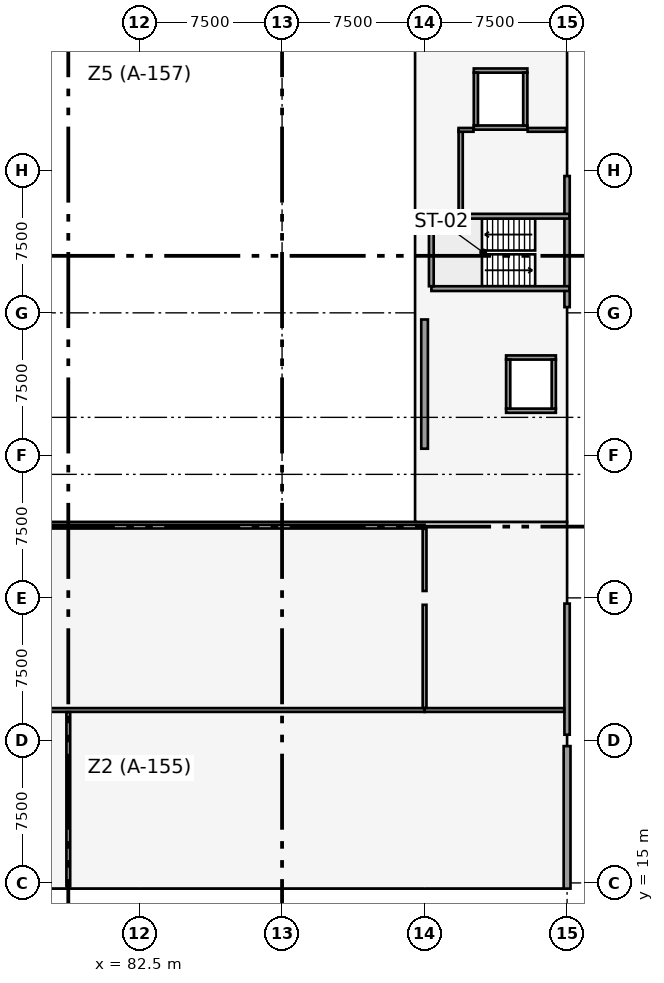
"""IFC4 building model, lengths in metres.
Left out: names, types, materials, properties, quantities, classifications, styles, units other than length and angle.
Written with IfcOpenShell. Run it as: python <this file> out.ifc"""

import sys

from ifc_helpers import new_model, si_unit, direction, frame, frame_2d, origin, origin_2d, place, context, subcontext, project, spatial, rectangle, extrude, element, fill, save


model = new_model("IFC4")
c1 = context("Model", 3, precision=1e-05, world=origin(), true_north=direction((0.0, 1.0)))
c2 = subcontext(c1, "Body", "Model", "MODEL_VIEW")
j1 = project(units=[si_unit("LENGTHUNIT", "METRE"), si_unit("PLANEANGLEUNIT", "RADIAN")], contexts=[c1])
p1 = place(None, origin())
s1 = spatial("IfcSite", under=j1, at=p1, CompositionType="ELEMENT")
p2 = place(p1, origin())
s2 = spatial("IfcBuilding", under=s1, at=p2, CompositionType="ELEMENT")
p3 = place(p2, frame((0.0, 0.0, 17.1)))
s3 = spatial("IfcBuildingStorey", under=s2, at=p3, CompositionType="ELEMENT", Elevation=17.1)
for number, where, z_axis, x_axis in (
    (1, (90.0, 22.5, 0.0), (0.0, 0.0, 1.0), (1.0, 0.0, 0.0)),
    (2, (90.0, 30.0, 0.0), (0.0, 0.0, 1.0), (1.0, 0.0, 0.0)),
    (3, (97.5, 22.5, 0.0), (0.0, 0.0, 1.0), (1.0, 0.0, 0.0)),
    (4, (97.5, 30.0, 0.0), (0.0, 0.0, 1.0), (1.0, 0.0, 0.0)),
    (5, (97.5, 37.5, 0.0), (0.0, 0.0, 1.0), (1.0, 0.0, 0.0)),
    (6, (97.5, 45.0, 0.0), (0.0, 0.0, 1.0), (1.0, 0.0, 0.0)),
    (7, (97.5, 52.5, 0.0), (0.0, 0.0, 1.0), (1.0, 0.0, 0.0)),
):
    element("IfcColumn", number, at=place(p3, frame(where, z_axis=z_axis, x_axis=x_axis)), inside=s3, PredefinedType="COLUMN", context=c2, shape_type="SweptSolid", body=[
        extrude(rectangle(XDim=0.7, YDim=0.7, at=origin_2d()), origin(), (0.0, 0.0, 1.0), 3.9),
    ])
p4 = place(p3, frame((105.0, 22.5, 0.0), z_axis=(0.0, 0.0, 1.0), x_axis=(1.0, 0.0, 0.0)))
e8 = element("IfcColumn", 8, at=p4, inside=s3, PredefinedType="COLUMN", context=c2, shape_type="SweptSolid", body=[
    extrude(rectangle(XDim=0.6, YDim=1.1, at=origin_2d()), origin(), (0.0, 0.0, 1.0), 3.9),
])
for number, where, z_axis, x_axis in (
    (9, (105.0, 30.0, 0.0), (0.0, 0.0, 1.0), (1.0, 0.0, 0.0)),
    (10, (105.0, 37.5, 0.0), (0.0, 0.0, 1.0), (1.0, 0.0, 0.0)),
    (11, (105.0, 45.0, 0.0), (0.0, 0.0, 1.0), (1.0, 0.0, 0.0)),
    (12, (105.0, 52.5, 0.0), (0.0, 0.0, 1.0), (1.0, 0.0, 0.0)),
):
    element("IfcColumn", number, at=place(p3, frame(where, z_axis=z_axis, x_axis=x_axis)), inside=s3, PredefinedType="COLUMN", context=c2, shape_type="SweptSolid", body=[
        extrude(rectangle(XDim=0.7, YDim=0.7, at=origin_2d()), origin(), (0.0, 0.0, 1.0), 3.9),
    ])
p5 = place(p3, frame((97.5, 37.85, 0.0), z_axis=(0.0, 0.0, 1.0), x_axis=(0.0, 1.0, 0.0)))
e13 = element("IfcWall", 13, at=p5, inside=s3, PredefinedType="SHEAR", context=c2, shape_type="SweptSolid", body=[
    extrude(rectangle(XDim=6.8, YDim=0.35, at=frame_2d((3.4, 0.0))), origin(), (0.0, 0.0, 1.0), 2.42),
])
p6 = place(p3, frame((105.0, 14.7, 0.0), z_axis=(0.0, 0.0, 1.0), x_axis=(0.0, 1.0, 0.0)))
e14 = element("IfcWall", 14, at=p6, inside=s3, PredefinedType="SOLIDWALL", context=c2, shape_type="SweptSolid", body=[
    extrude(rectangle(XDim=7.5, YDim=0.36, at=frame_2d((3.75, 0.0))), origin(), (0.0, 0.0, 1.0), 2.39),
])
p7 = place(p3, frame((105.0, 22.8, 0.0), z_axis=(0.0, 0.0, 1.0), x_axis=(0.0, 1.0, 0.0)))
e15 = element("IfcWall", 15, at=p7, inside=s3, PredefinedType="SOLIDWALL", context=c2, shape_type="SweptSolid", body=[
    extrude(rectangle(XDim=6.9, YDim=0.28, at=frame_2d((3.45, 0.0))), origin(), (0.0, 0.0, 1.0), 2.39),
])
p8 = place(p3, frame((105.0, 45.3, 0.0), z_axis=(0.0, 0.0, 1.0), x_axis=(0.0, 1.0, 0.0)))
e16 = element("IfcWall", 16, at=p8, inside=s3, PredefinedType="SOLIDWALL", context=c2, shape_type="SweptSolid", body=[
    extrude(rectangle(XDim=6.9, YDim=0.28, at=frame_2d((3.45, 0.0))), origin(), (0.0, 0.0, 1.0), 2.54),
])
p9 = place(p3, frame((97.86, 46.275, 0.0), z_axis=(0.0, 0.0, 1.0), x_axis=(1.0, 0.0, 0.0)))
e17 = element("IfcWall", 17, at=p9, inside=s3, PredefinedType="SOLIDWALL", context=c2, shape_type="SweptSolid", body=[
    extrude(rectangle(XDim=7.26, YDim=0.25, at=frame_2d((3.63, 0.0))), origin(), (0.0, 0.0, 1.0), 3.62),
])
p10 = place(p9, frame((5.54, 0.0, 0.0)))
e18 = element("IfcOpeningElement", 18, at=p10, cuts=e17, PredefinedType="OPENING", context=c2, shape_type="SweptSolid", body=[
    extrude(rectangle(XDim=1.1, YDim=2.15, at=frame_2d((0.55, 1.075))), frame((0.0, 0.135, 0.0), z_axis=(0.0, -1.0, 0.0), x_axis=(1.0, 0.0, 0.0)), (0.0, 0.0, 1.0), 0.27),
])
p11 = place(p3, frame((97.86, 50.085, 0.0), z_axis=(0.0, 0.0, 1.0), x_axis=(1.0, 0.0, 0.0)))
e19 = element("IfcWall", 19, at=p11, inside=s3, PredefinedType="SOLIDWALL", context=c2, shape_type="SweptSolid", body=[
    extrude(rectangle(XDim=7.26, YDim=0.25, at=frame_2d((3.63, 0.0))), origin(), (0.0, 0.0, 1.0), 3.62),
])
p12 = place(p11, frame((5.54, 0.0, 0.0)))
e20 = element("IfcOpeningElement", 20, at=p12, cuts=e19, PredefinedType="OPENING", context=c2, shape_type="SweptSolid", body=[
    extrude(rectangle(XDim=1.1, YDim=2.15, at=frame_2d((0.55, 1.075))), frame((0.0, 0.135, 0.0), z_axis=(0.0, -1.0, 0.0), x_axis=(1.0, 0.0, 0.0)), (0.0, 0.0, 1.0), 0.27),
])
p13 = place(p3, frame((97.855, 46.4, 0.0), z_axis=(0.0, 0.0, 1.0), x_axis=(0.0, 1.0, 0.0)))
e21 = element("IfcWall", 21, at=p13, inside=s3, PredefinedType="SOLIDWALL", context=c2, shape_type="SweptSolid", body=[
    extrude(rectangle(XDim=3.56, YDim=0.25, at=frame_2d((1.78, 0.0))), origin(), (0.0, 0.0, 1.0), 3.62),
])
for number, where, z_axis, x_axis in (
    (22, (101.79, 39.85, 0.0), (0.0, 0.0, 1.0), (1.0, 0.0, 0.0)),
    (23, (101.79, 42.65, 0.0), (0.0, 0.0, 1.0), (1.0, 0.0, 0.0)),
):
    element("IfcWall", number, at=place(p3, frame(where, z_axis=z_axis, x_axis=x_axis)), inside=s3, PredefinedType="SOLIDWALL", context=c2, shape_type="SweptSolid", body=[
        extrude(rectangle(XDim=2.62, YDim=0.22, at=frame_2d((1.31, 0.0))), origin(), (0.0, 0.0, 1.0), 3.62),
    ])
p14 = place(p3, frame((101.9, 39.96, 0.0), z_axis=(0.0, 0.0, 1.0), x_axis=(0.0, 1.0, 0.0)))
e24 = element("IfcWall", 24, at=p14, inside=s3, PredefinedType="SOLIDWALL", context=c2, shape_type="SweptSolid", body=[
    extrude(rectangle(XDim=2.58, YDim=0.22, at=frame_2d((1.29, 0.0))), origin(), (0.0, 0.0, 1.0), 3.62),
])
p15 = place(p14, frame((0.79, 0.0, 0.0)))
e25 = element("IfcOpeningElement", 25, at=p15, cuts=e24, PredefinedType="OPENING", context=c2, shape_type="SweptSolid", body=[
    extrude(rectangle(XDim=1.0, YDim=2.15, at=frame_2d((0.5, 1.075))), frame((0.0, 0.12, 0.0), z_axis=(0.0, -1.0, 0.0), x_axis=(1.0, 0.0, 0.0)), (0.0, 0.0, 1.0), 0.24),
])
p16 = place(p3, frame((104.3, 39.96, 0.0), z_axis=(0.0, 0.0, 1.0), x_axis=(0.0, 1.0, 0.0)))
e26 = element("IfcWall", 26, at=p16, inside=s3, PredefinedType="SOLIDWALL", context=c2, shape_type="SweptSolid", body=[
    extrude(rectangle(XDim=2.58, YDim=0.22, at=frame_2d((1.29, 0.0))), origin(), (0.0, 0.0, 1.0), 3.62),
])
p17 = place(p3, frame((100.09, 54.75, 0.0), z_axis=(0.0, 0.0, 1.0), x_axis=(1.0, 0.0, 0.0)))
e27 = element("IfcWall", 27, at=p17, inside=s3, PredefinedType="SOLIDWALL", context=c2, shape_type="SweptSolid", body=[
    extrude(rectangle(XDim=2.82, YDim=0.22, at=frame_2d((1.41, 0.0))), origin(), (0.0, 0.0, 1.0), 3.62),
])
p18 = place(p17, frame((0.86, 0.0, 0.0)))
e28 = element("IfcOpeningElement", 28, at=p18, cuts=e27, PredefinedType="OPENING", context=c2, shape_type="SweptSolid", body=[
    extrude(rectangle(XDim=1.1, YDim=2.15, at=frame_2d((0.55, 1.075))), frame((0.0, 0.12, 0.0), z_axis=(0.0, -1.0, 0.0), x_axis=(1.0, 0.0, 0.0)), (0.0, 0.0, 1.0), 0.24),
])
p19 = place(p3, frame((100.09, 57.75, 0.0), z_axis=(0.0, 0.0, 1.0), x_axis=(1.0, 0.0, 0.0)))
e29 = element("IfcWall", 29, at=p19, inside=s3, PredefinedType="SOLIDWALL", context=c2, shape_type="SweptSolid", body=[
    extrude(rectangle(XDim=2.82, YDim=0.22, at=frame_2d((1.41, 0.0))), origin(), (0.0, 0.0, 1.0), 3.62),
])
for number, where, z_axis, x_axis in (
    (30, (100.2, 54.86, 0.0), (0.0, 0.0, 1.0), (0.0, 1.0, 0.0)),
    (31, (102.8, 54.86, 0.0), (0.0, 0.0, 1.0), (0.0, 1.0, 0.0)),
):
    element("IfcWall", number, at=place(p3, frame(where, z_axis=z_axis, x_axis=x_axis)), inside=s3, PredefinedType="SOLIDWALL", context=c2, shape_type="SweptSolid", body=[
        extrude(rectangle(XDim=2.78, YDim=0.22, at=frame_2d((1.39, 0.0))), origin(), (0.0, 0.0, 1.0), 3.62),
    ])
p20 = place(p3, frame((99.4, 50.22, 0.0), z_axis=(0.0, 0.0, 1.0), x_axis=(0.0, 1.0, 0.0)))
e32 = element("IfcWall", 32, at=p20, inside=s3, PredefinedType="SOLIDWALL", context=c2, shape_type="SweptSolid", body=[
    extrude(rectangle(XDim=4.41, YDim=0.22, at=frame_2d((2.205, 0.0))), origin(), (0.0, 0.0, 1.0), 3.62),
])
p21 = place(p20, frame((0.45, 0.0, 0.0)))
e33 = element("IfcOpeningElement", 33, at=p21, cuts=e32, PredefinedType="OPENING", context=c2, shape_type="SweptSolid", body=[
    extrude(rectangle(XDim=1.1, YDim=2.15, at=frame_2d((0.55, 1.075))), frame((0.0, 0.12, 0.0), z_axis=(0.0, -1.0, 0.0), x_axis=(1.0, 0.0, 0.0)), (0.0, 0.0, 1.0), 0.24),
])
p22 = place(p3, frame((99.29, 54.63, 0.0), z_axis=(0.0, 0.0, 1.0), x_axis=(1.0, 0.0, 0.0)))
e34 = element("IfcWall", 34, at=p22, inside=s3, PredefinedType="PARTITIONING", context=c2, shape_type="SweptSolid", body=[
    extrude(rectangle(XDim=0.785, YDim=0.2, at=frame_2d((0.393, 0.0))), origin(), (0.0, 0.0, 1.0), 3.6),
])
p23 = place(p3, frame((102.925, 54.63, 0.0), z_axis=(0.0, 0.0, 1.0), x_axis=(1.0, 0.0, 0.0)))
e35 = element("IfcWall", 35, at=p23, inside=s3, PredefinedType="PARTITIONING", context=c2, shape_type="SweptSolid", body=[
    extrude(rectangle(XDim=2.015, YDim=0.2, at=frame_2d((1.007, 0.0))), origin(), (0.0, 0.0, 1.0), 3.0),
])
p24 = place(p3, frame((97.5, 24.1, 0.0), z_axis=(0.0, 0.0, 1.0), x_axis=(1.0, 0.0, 0.0)))
e36 = element("IfcWall", 36, at=p24, inside=s3, PredefinedType="PARTITIONING", context=c2, shape_type="SweptSolid", body=[
    extrude(rectangle(XDim=7.346, YDim=0.2, at=frame_2d((3.673, 0.0))), origin(), (0.0, 0.0, 1.0), 2.39),
])
p25 = place(p24, frame((3.15, 0.0, 0.0)))
e37 = element("IfcOpeningElement", 37, at=p25, cuts=e36, PredefinedType="OPENING", context=c2, shape_type="SweptSolid", body=[
    extrude(rectangle(XDim=1.2, YDim=2.15, at=frame_2d((0.6, 1.075))), frame((0.0, 0.11, 0.0), z_axis=(0.0, -1.0, 0.0), x_axis=(1.0, 0.0, 0.0)), (0.0, 0.0, 1.0), 0.22),
])
for number, where, z_axis, x_axis in (
    (38, (60.0, 24.1, 0.0), (0.0, 0.0, 1.0), (1.0, 0.0, 0.0)),
    (39, (60.0, 33.75, 0.0), (0.0, 0.0, 1.0), (1.0, 0.0, 0.0)),
):
    element("IfcWall", number, at=place(p3, frame(where, z_axis=z_axis, x_axis=x_axis)), inside=s3, PredefinedType="PARTITIONING", context=c2, shape_type="SweptSolid", body=[
        extrude(rectangle(XDim=37.5, YDim=0.2, at=frame_2d((18.75, 0.0))), origin(), (0.0, 0.0, 1.0), 2.39),
    ])
p26 = place(p3, frame((78.75, 14.832, 0.0), z_axis=(0.0, 0.0, 1.0), x_axis=(0.0, 1.0, 0.0)))
e40 = element("IfcWall", 40, at=p26, inside=s3, PredefinedType="PARTITIONING", context=c2, shape_type="SweptSolid", body=[
    extrude(rectangle(XDim=9.154, YDim=0.2, at=frame_2d((4.577, 0.0))), origin(), (0.0, 0.0, 1.0), 2.59),
])
p27 = place(p26, frame((3.718, 0.0, 0.0)))
e41 = element("IfcOpeningElement", 41, at=p27, cuts=e40, PredefinedType="OPENING", context=c2, shape_type="SweptSolid", body=[
    extrude(rectangle(XDim=1.3, YDim=2.15, at=frame_2d((0.65, 1.075))), frame((0.0, 0.11, 0.0), z_axis=(0.0, -1.0, 0.0), x_axis=(1.0, 0.0, 0.0)), (0.0, 0.0, 1.0), 0.22),
])
p28 = place(p3, frame((97.5, 24.214, 0.0), z_axis=(0.0, 0.0, 1.0), x_axis=(0.0, 1.0, 0.0)))
e42 = element("IfcWall", 42, at=p28, inside=s3, PredefinedType="PARTITIONING", context=c2, shape_type="SweptSolid", body=[
    extrude(rectangle(XDim=5.422, YDim=0.2, at=frame_2d((2.711, 0.0))), origin(), (0.0, 0.0, 1.0), 2.39),
])
p29 = place(p28, frame((2.186, 0.0, 0.0)))
e43 = element("IfcOpeningElement", 43, at=p29, cuts=e42, PredefinedType="OPENING", context=c2, shape_type="SweptSolid", body=[
    extrude(rectangle(XDim=1.2, YDim=2.15, at=frame_2d((0.6, 1.075))), frame((0.0, 0.11, 0.0), z_axis=(0.0, -1.0, 0.0), x_axis=(1.0, 0.0, 0.0)), (0.0, 0.0, 1.0), 0.22),
])
p30 = place(p3, frame((97.5, 30.364, 0.0), z_axis=(0.0, 0.0, 1.0), x_axis=(0.0, 1.0, 0.0)))
e44 = element("IfcWall", 44, at=p30, inside=s3, PredefinedType="PARTITIONING", context=c2, shape_type="SweptSolid", body=[
    extrude(rectangle(XDim=3.272, YDim=0.2, at=frame_2d((1.636, 0.0))), origin(), (0.0, 0.0, 1.0), 2.39),
])
p31 = place(p10, origin())
e45 = element("IfcDoor", 45, at=p31, inside=s3, OperationType="SINGLE_SWING_LEFT", PredefinedType="DOOR", context=c2, shape_type="SweptSolid", body=[
    extrude(rectangle(XDim=1.1, YDim=2.15, at=frame_2d((0.55, 1.075))), frame((0.0, 0.025, 0.0), z_axis=(0.0, -1.0, 0.0), x_axis=(1.0, 0.0, 0.0)), (0.0, 0.0, 1.0), 0.05),
])
fill(e18, e45)
p32 = place(p12, frame((1.1, 0.0, 0.0), z_axis=(0.0, 0.0, 1.0), x_axis=(-1.0, 0.0, 0.0)))
e46 = element("IfcDoor", 46, at=p32, inside=s3, OperationType="SINGLE_SWING_RIGHT", PredefinedType="DOOR", context=c2, shape_type="SweptSolid", body=[
    extrude(rectangle(XDim=1.1, YDim=2.15, at=frame_2d((0.55, 1.075))), frame((0.0, 0.025, 0.0), z_axis=(0.0, -1.0, 0.0), x_axis=(1.0, 0.0, 0.0)), (0.0, 0.0, 1.0), 0.05),
])
fill(e20, e46)
p33 = place(p15, origin())
e47 = element("IfcDoor", 47, at=p33, inside=s3, OperationType="SLIDING_TO_LEFT", PredefinedType="DOOR", context=c2, shape_type="SweptSolid", body=[
    extrude(rectangle(XDim=1.0, YDim=2.15, at=frame_2d((0.5, 1.075))), frame((0.0, 0.025, 0.0), z_axis=(0.0, -1.0, 0.0), x_axis=(1.0, 0.0, 0.0)), (0.0, 0.0, 1.0), 0.05),
])
fill(e25, e47)
p34 = place(p18, origin())
e48 = element("IfcDoor", 48, at=p34, inside=s3, OperationType="SLIDING_TO_LEFT", PredefinedType="DOOR", context=c2, shape_type="SweptSolid", body=[
    extrude(rectangle(XDim=1.1, YDim=2.15, at=frame_2d((0.55, 1.075))), frame((0.0, 0.025, 0.0), z_axis=(0.0, -1.0, 0.0), x_axis=(1.0, 0.0, 0.0)), (0.0, 0.0, 1.0), 0.05),
])
fill(e28, e48)
p35 = place(p21, origin())
e49 = element("IfcDoor", 49, at=p35, inside=s3, OperationType="SINGLE_SWING_LEFT", PredefinedType="DOOR", context=c2, shape_type="SweptSolid", body=[
    extrude(rectangle(XDim=1.1, YDim=2.15, at=frame_2d((0.55, 1.075))), frame((0.0, 0.025, 0.0), z_axis=(0.0, -1.0, 0.0), x_axis=(1.0, 0.0, 0.0)), (0.0, 0.0, 1.0), 0.05),
])
fill(e33, e49)
p36 = place(p25, origin())
e50 = element("IfcDoor", 50, at=p36, inside=s3, OperationType="SINGLE_SWING_LEFT", PredefinedType="DOOR", context=c2, shape_type="SweptSolid", body=[
    extrude(rectangle(XDim=1.2, YDim=2.15, at=frame_2d((0.6, 1.075))), frame((0.0, 0.025, 0.0), z_axis=(0.0, -1.0, 0.0), x_axis=(1.0, 0.0, 0.0)), (0.0, 0.0, 1.0), 0.05),
])
fill(e37, e50)
p37 = place(p27, origin())
e51 = element("IfcDoor", 51, at=p37, inside=s3, OperationType="SINGLE_SWING_RIGHT", PredefinedType="DOOR", context=c2, shape_type="SweptSolid", body=[
    extrude(rectangle(XDim=1.3, YDim=2.15, at=frame_2d((0.65, 1.075))), frame((0.0, 0.025, 0.0), z_axis=(0.0, -1.0, 0.0), x_axis=(1.0, 0.0, 0.0)), (0.0, 0.0, 1.0), 0.05),
])
fill(e41, e51)
p38 = place(p29, origin())
e52 = element("IfcDoor", 52, at=p38, inside=s3, OperationType="SINGLE_SWING_RIGHT", PredefinedType="DOOR", context=c2, shape_type="SweptSolid", body=[
    extrude(rectangle(XDim=1.2, YDim=2.15, at=frame_2d((0.6, 1.075))), frame((0.0, 0.025, 0.0), z_axis=(0.0, -1.0, 0.0), x_axis=(1.0, 0.0, 0.0)), (0.0, 0.0, 1.0), 0.05),
])
fill(e43, e52)
save(model, sys.argv[1])
